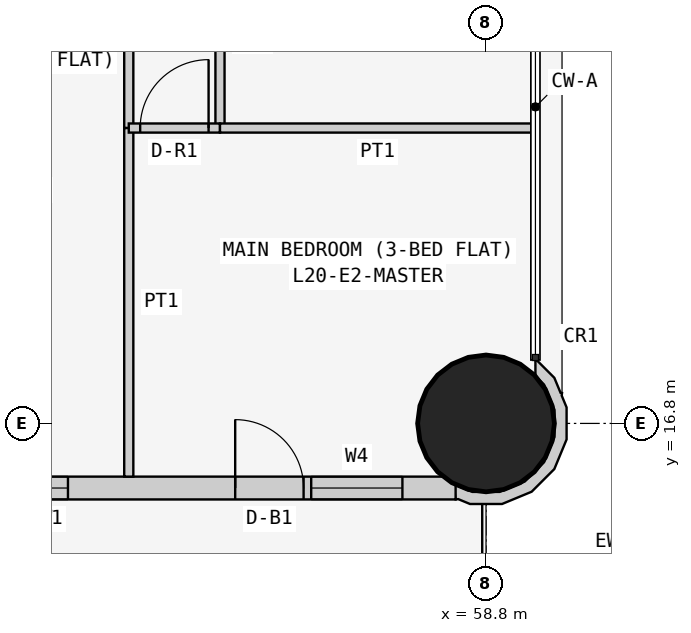
"""IFC4 building model, lengths in metres.
Left out: names, types, materials, properties, quantities, classifications, styles, units other than length and angle.
Written with IfcOpenShell. Run it as: python <this file> out.ifc"""

import sys

from ifc_helpers import new_model, si_unit, direction, frame, frame_2d, origin, origin_2d, place, context, subcontext, project, spatial, polyline, rectangle, circle, outline, extrude, element, fill, save


model = new_model("IFC4")
c1 = context("Model", 3, precision=1e-05, world=origin(), true_north=direction((0.0, 1.0)))
c2 = subcontext(c1, "Body", "Model", "MODEL_VIEW")
j1 = project(units=[si_unit("LENGTHUNIT", "METRE"), si_unit("PLANEANGLEUNIT", "RADIAN")], contexts=[c1])
p1 = place(None, origin())
s1 = spatial("IfcSite", under=j1, at=p1, CompositionType="ELEMENT")
p2 = place(p1, origin())
s2 = spatial("IfcBuilding", under=s1, at=p2, CompositionType="ELEMENT")
p3 = place(p2, frame((0.0, 0.0, 81.3)))
s3 = spatial("IfcBuildingStorey", under=s2, at=p3, CompositionType="ELEMENT", Elevation=81.3)
p4 = place(p3, frame((58.8, 16.8, 0.0), z_axis=(0.0, 0.0, 1.0), x_axis=(1.0, 0.0, 0.0)))
e1 = element("IfcColumn", 1, at=p4, inside=s3, PredefinedType="COLUMN", context=c2, shape_type="SweptSolid", body=[
    extrude(circle(Radius=0.9, at=origin_2d()), origin(), (0.0, 0.0, 1.0), 3.6),
])
p5 = place(p3, frame((43.0, 15.95, 0.0), z_axis=(0.0, 0.0, 1.0), x_axis=(1.0, 0.0, 0.0)))
e2 = element("IfcWall", 2, at=p5, inside=s3, PredefinedType="SOLIDWALL", context=c2, shape_type="SweptSolid", body=[
    extrude(rectangle(XDim=15.4, YDim=0.3, at=frame_2d((7.7, 0.0))), origin(), (0.0, 0.0, 1.0), 3.45),
])
p6 = place(p5, frame((1.2, 0.0, 0.9)))
e3 = element("IfcOpeningElement", 3, at=p6, cuts=e2, PredefinedType="OPENING", context=c2, shape_type="SweptSolid", body=[
    extrude(rectangle(XDim=1.8, YDim=1.5, at=frame_2d((0.9, 0.75))), frame((0.0, 0.16, 0.0), z_axis=(0.0, -1.0, 0.0), x_axis=(1.0, 0.0, 0.0)), (0.0, 0.0, 1.0), 0.32),
])
p7 = place(p5, frame((4.95, 0.0, 1.5)))
e4 = element("IfcOpeningElement", 4, at=p7, cuts=e2, PredefinedType="OPENING", context=c2, shape_type="SweptSolid", body=[
    extrude(rectangle(XDim=0.9, YDim=0.7, at=frame_2d((0.45, 0.35))), frame((0.0, 0.16, 0.0), z_axis=(0.0, -1.0, 0.0), x_axis=(1.0, 0.0, 0.0)), (0.0, 0.0, 1.0), 0.32),
])
p8 = place(p5, frame((8.5, 0.0, 0.9)))
e5 = element("IfcOpeningElement", 5, at=p8, cuts=e2, PredefinedType="OPENING", context=c2, shape_type="SweptSolid", body=[
    extrude(rectangle(XDim=1.8, YDim=1.5, at=frame_2d((0.9, 0.75))), frame((0.0, 0.16, 0.0), z_axis=(0.0, -1.0, 0.0), x_axis=(1.0, 0.0, 0.0)), (0.0, 0.0, 1.0), 0.32),
])
p9 = place(p5, frame((12.5, 0.0, 0.0)))
e6 = element("IfcOpeningElement", 6, at=p9, cuts=e2, PredefinedType="OPENING", context=c2, shape_type="SweptSolid", body=[
    extrude(rectangle(XDim=0.9, YDim=2.4, at=frame_2d((0.45, 1.2))), frame((0.0, 0.16, 0.0), z_axis=(0.0, -1.0, 0.0), x_axis=(1.0, 0.0, 0.0)), (0.0, 0.0, 1.0), 0.32),
])
p10 = place(p5, frame((13.5, 0.0, 0.9)))
e7 = element("IfcOpeningElement", 7, at=p10, cuts=e2, PredefinedType="OPENING", context=c2, shape_type="SweptSolid", body=[
    extrude(rectangle(XDim=1.2, YDim=1.5, at=frame_2d((0.6, 0.75))), frame((0.0, 0.16, 0.0), z_axis=(0.0, -1.0, 0.0), x_axis=(1.0, 0.0, 0.0)), (0.0, 0.0, 1.0), 0.32),
])
p11 = place(p3, frame((58.436, 15.89, 0.0), z_axis=(0.0, 0.0, 1.0), x_axis=(0.926129809145, -0.377204953059, 0.0)))
e8 = element("IfcWall", 8, at=p11, inside=s3, PredefinedType="SOLIDWALL", context=c2, shape_type="SweptSolid", body=[
    extrude(outline(polyline([(0.769, 1.728), (0.75, 1.723), (0.6, 1.875), (0.295, 2.004), (0.281, 1.998), (0.36, 1.803), (0.509, 1.741), (0.761, 1.486), (0.896, 1.154), (0.894, 0.795), (0.755, 0.465), (0.5, 0.213), (0.168, 0.078), (-0.1, 0.08), (0.0, -0.097), (0.03, -0.08), (0.198, -0.081), (0.589, 0.078), (0.889, 0.374), (1.052, 0.763), (1.055, 1.185), (0.896, 1.575), (0.778, 1.695), (0.769, 1.728)])), origin(), (0.0, 0.0, 1.0), 3.45),
])
p12 = place(p3, frame((54.1, 22.971, 0.0), z_axis=(0.0, 0.0, 1.0), x_axis=(0.0, -1.0, 0.0)))
e9 = element("IfcWall", 9, at=p12, inside=s3, PredefinedType="PARTITIONING", context=c2, shape_type="SweptSolid", body=[
    extrude(rectangle(XDim=2.285, YDim=0.12, at=frame_2d((1.143, 0.0))), origin(), (0.0, 0.0, 1.0), 3.45),
])
p13 = place(p3, frame((54.1, 20.686, 0.0), z_axis=(0.0, 0.0, 1.0), x_axis=(0.0, -1.0, 0.0)))
e10 = element("IfcWall", 10, at=p13, inside=s3, PredefinedType="PARTITIONING", context=c2, shape_type="SweptSolid", body=[
    extrude(rectangle(XDim=4.586, YDim=0.12, at=frame_2d((2.293, 0.0))), origin(), (0.0, 0.0, 1.0), 3.45),
])
p14 = place(p3, frame((55.3, 22.971, 0.0), z_axis=(0.0, 0.0, 1.0), x_axis=(0.0, -1.0, 0.0)))
e11 = element("IfcWall", 11, at=p14, inside=s3, PredefinedType="PARTITIONING", context=c2, shape_type="SweptSolid", body=[
    extrude(rectangle(XDim=2.285, YDim=0.12, at=frame_2d((1.143, 0.0))), origin(), (0.0, 0.0, 1.0), 3.45),
])
p15 = place(p3, frame((55.3, 20.686, 0.0), z_axis=(0.0, 0.0, 1.0), x_axis=(-1.0, 0.0, 0.0)))
e12 = element("IfcWall", 12, at=p15, inside=s3, PredefinedType="PARTITIONING", context=c2, shape_type="SweptSolid", body=[
    extrude(rectangle(XDim=1.2, YDim=0.12, at=frame_2d((0.6, 0.0))), origin(), (0.0, 0.0, 1.0), 3.45),
])
p16 = place(p15, frame((0.15, 0.0, 0.0)))
e13 = element("IfcOpeningElement", 13, at=p16, cuts=e12, PredefinedType="OPENING", context=c2, shape_type="SweptSolid", body=[
    extrude(rectangle(XDim=0.9, YDim=2.1, at=frame_2d((0.45, 1.05))), frame((0.0, 0.07, 0.0), z_axis=(0.0, -1.0, 0.0), x_axis=(1.0, 0.0, 0.0)), (0.0, 0.0, 1.0), 0.14),
])
p17 = place(p3, frame((59.45, 20.686, 0.0), z_axis=(0.0, 0.0, 1.0), x_axis=(-1.0, 0.0, 0.0)))
e14 = element("IfcWall", 14, at=p17, inside=s3, PredefinedType="PARTITIONING", context=c2, shape_type="SweptSolid", body=[
    extrude(rectangle(XDim=4.15, YDim=0.12, at=frame_2d((2.075, 0.0))), origin(), (0.0, 0.0, 1.0), 3.45),
])
p18 = place(p8, origin())
e15 = element("IfcWindow", 15, at=p18, inside=s3, PartitioningType="SINGLE_PANEL", PredefinedType="WINDOW", context=c2, shape_type="SweptSolid", body=[
    extrude(rectangle(XDim=1.8, YDim=1.5, at=frame_2d((0.9, 0.75))), frame((0.0, 0.03, 0.0), z_axis=(0.0, -1.0, 0.0), x_axis=(1.0, 0.0, 0.0)), (0.0, 0.0, 1.0), 0.06),
])
fill(e5, e15)
p19 = place(p9, origin())
e16 = element("IfcDoor", 16, at=p19, inside=s3, OperationType="SINGLE_SWING_LEFT", PredefinedType="DOOR", context=c2, shape_type="SweptSolid", body=[
    extrude(rectangle(XDim=0.9, YDim=2.4, at=frame_2d((0.45, 1.2))), frame((0.0, 0.025, 0.0), z_axis=(0.0, -1.0, 0.0), x_axis=(1.0, 0.0, 0.0)), (0.0, 0.0, 1.0), 0.05),
])
fill(e6, e16)
p20 = place(p10, origin())
e17 = element("IfcWindow", 17, at=p20, inside=s3, PartitioningType="SINGLE_PANEL", PredefinedType="WINDOW", context=c2, shape_type="SweptSolid", body=[
    extrude(rectangle(XDim=1.2, YDim=1.5, at=frame_2d((0.6, 0.75))), frame((0.0, 0.03, 0.0), z_axis=(0.0, -1.0, 0.0), x_axis=(1.0, 0.0, 0.0)), (0.0, 0.0, 1.0), 0.06),
])
fill(e7, e17)
p21 = place(p16, frame((0.9, 0.0, 0.0), z_axis=(0.0, 0.0, 1.0), x_axis=(-1.0, 0.0, 0.0)))
e18 = element("IfcDoor", 18, at=p21, inside=s3, OperationType="SINGLE_SWING_RIGHT", PredefinedType="DOOR", context=c2, shape_type="SweptSolid", body=[
    extrude(rectangle(XDim=0.9, YDim=2.1, at=frame_2d((0.45, 1.05))), frame((0.0, 0.025, 0.0), z_axis=(0.0, -1.0, 0.0), x_axis=(1.0, 0.0, 0.0)), (0.0, 0.0, 1.0), 0.05),
])
fill(e13, e18)
save(model, sys.argv[1])
